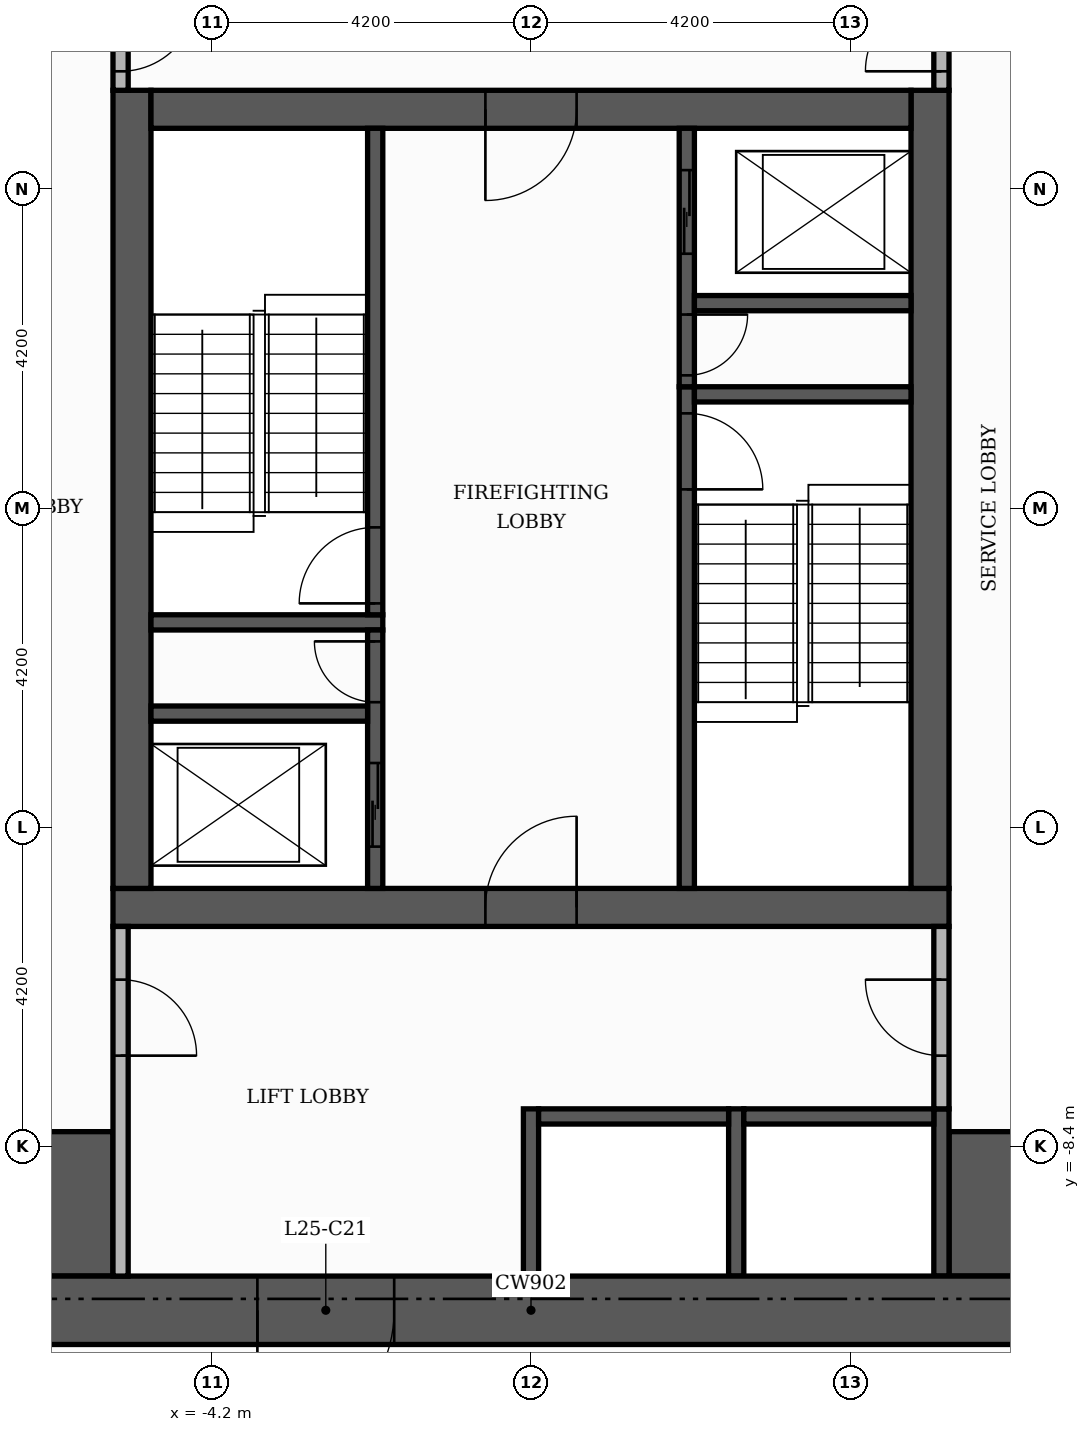
"""IFC4 building model, lengths in metres.
Left out: names, types, materials, properties, quantities, classifications, styles, units other than length and angle.
Written with IfcOpenShell. Run it as: python <this file> out.ifc"""

import sys

from ifc_helpers import new_model, si_unit, direction, frame, frame_2d, origin, place, context, subcontext, project, spatial, rectangle, extrude, element, fill, save


model = new_model("IFC4")
c1 = context("Model", 3, precision=1e-05, world=origin(), true_north=direction((0.0, 1.0)))
c2 = subcontext(c1, "Body", "Model", "MODEL_VIEW")
j1 = project(units=[si_unit("LENGTHUNIT", "METRE"), si_unit("PLANEANGLEUNIT", "RADIAN")], contexts=[c1])
p1 = place(None, origin())
s1 = spatial("IfcSite", under=j1, at=p1, CompositionType="ELEMENT")
p2 = place(p1, origin())
s2 = spatial("IfcBuilding", under=s1, at=p2, CompositionType="ELEMENT")
p3 = place(p2, frame((0.0, 0.0, 106.5)))
s3 = spatial("IfcBuildingStorey", under=s2, at=p3, CompositionType="ELEMENT", Elevation=106.5)
p4 = place(p3, frame((-5.5, -5.25, 0.0), z_axis=(0.0, 0.0, 1.0), x_axis=(1.0, 0.0, 0.0)))
e1 = element("IfcWall", 1, at=p4, inside=s3, PredefinedType="SHEAR", context=c2, shape_type="SweptSolid", body=[
    extrude(rectangle(XDim=11.0, YDim=0.5, at=frame_2d((5.5, 0.0))), origin(), (0.0, 0.0, 1.0), 3.48),
])
p5 = place(p4, frame((4.9, 0.0, 0.0)))
e2 = element("IfcOpeningElement", 2, at=p5, cuts=e1, PredefinedType="OPENING", context=c2, shape_type="SweptSolid", body=[
    extrude(rectangle(XDim=1.2, YDim=2.1, at=frame_2d((0.6, 1.05))), frame((0.0, 0.26, 0.0), z_axis=(0.0, -1.0, 0.0), x_axis=(1.0, 0.0, 0.0)), (0.0, 0.0, 1.0), 0.52),
])
for number, where, z_axis, x_axis in (
    (3, (-5.25, -5.0, 0.0), (0.0, 0.0, 1.0), (0.0, 1.0, 0.0)),
    (4, (5.25, -5.0, 0.0), (0.0, 0.0, 1.0), (0.0, 1.0, 0.0)),
):
    element("IfcWall", number, at=place(p3, frame(where, z_axis=z_axis, x_axis=x_axis)), inside=s3, PredefinedType="SHEAR", context=c2, shape_type="SweptSolid", body=[
        extrude(rectangle(XDim=10.5, YDim=0.5, at=frame_2d((5.25, 0.0))), origin(), (0.0, 0.0, 1.0), 3.48),
    ])
p6 = place(p3, frame((-5.0, 5.25, 0.0), z_axis=(0.0, 0.0, 1.0), x_axis=(1.0, 0.0, 0.0)))
e5 = element("IfcWall", 5, at=p6, inside=s3, PredefinedType="SHEAR", context=c2, shape_type="SweptSolid", body=[
    extrude(rectangle(XDim=10.0, YDim=0.5, at=frame_2d((5.0, 0.0))), origin(), (0.0, 0.0, 1.0), 3.48),
])
p7 = place(p6, frame((4.4, 0.0, 0.0)))
e6 = element("IfcOpeningElement", 6, at=p7, cuts=e5, PredefinedType="OPENING", context=c2, shape_type="SweptSolid", body=[
    extrude(rectangle(XDim=1.2, YDim=2.1, at=frame_2d((0.6, 1.05))), frame((0.0, 0.26, 0.0), z_axis=(0.0, -1.0, 0.0), x_axis=(1.0, 0.0, 0.0)), (0.0, 0.0, 1.0), 0.52),
])
for number, where, z_axis, x_axis in (
    (7, (-10.1, -9.15, 0.0), (0.0, 0.0, 1.0), (1.0, 0.0, 0.0)),
    (8, (5.5, -9.15, 0.0), (0.0, 0.0, 1.0), (1.0, 0.0, 0.0)),
):
    element("IfcWall", number, at=place(p3, frame(where, z_axis=z_axis, x_axis=x_axis)), inside=s3, PredefinedType="SHEAR", context=c2, shape_type="SweptSolid", body=[
        extrude(rectangle(XDim=4.6, YDim=1.9, at=frame_2d((2.3, 0.0))), origin(), (0.0, 0.0, 1.0), 3.48),
    ])
p8 = place(p3, frame((2.05, -5.0, 0.0), z_axis=(0.0, 0.0, 1.0), x_axis=(0.0, 1.0, 0.0)))
e9 = element("IfcWall", 9, at=p8, inside=s3, PredefinedType="SHEAR", context=c2, shape_type="SweptSolid", body=[
    extrude(rectangle(XDim=6.6, YDim=0.2, at=frame_2d((3.3, 0.0))), origin(), (0.0, 0.0, 1.0), 3.48),
])
p9 = place(p8, frame((5.25, 0.0, 0.0)))
e10 = element("IfcOpeningElement", 10, at=p9, cuts=e9, PredefinedType="OPENING", context=c2, shape_type="SweptSolid", body=[
    extrude(rectangle(XDim=1.0, YDim=2.1, at=frame_2d((0.5, 1.05))), frame((0.0, 0.11, 0.0), z_axis=(0.0, -1.0, 0.0), x_axis=(1.0, 0.0, 0.0)), (0.0, 0.0, 1.0), 0.22),
])
p10 = place(p3, frame((-5.0, -1.5, 0.0), z_axis=(0.0, 0.0, 1.0), x_axis=(1.0, 0.0, 0.0)))
e11 = element("IfcWall", 11, at=p10, inside=s3, PredefinedType="SHEAR", context=c2, shape_type="SweptSolid", body=[
    extrude(rectangle(XDim=3.05, YDim=0.2, at=frame_2d((1.525, 0.0))), origin(), (0.0, 0.0, 1.0), 3.48),
])
p11 = place(p3, frame((-2.05, -1.4, 0.0), z_axis=(0.0, 0.0, 1.0), x_axis=(0.0, 1.0, 0.0)))
e12 = element("IfcWall", 12, at=p11, inside=s3, PredefinedType="SHEAR", context=c2, shape_type="SweptSolid", body=[
    extrude(rectangle(XDim=6.4, YDim=0.2, at=frame_2d((3.2, 0.0))), origin(), (0.0, 0.0, 1.0), 3.48),
])
p12 = place(p11, frame((0.15, 0.0, 0.0)))
e13 = element("IfcOpeningElement", 13, at=p12, cuts=e12, PredefinedType="OPENING", context=c2, shape_type="SweptSolid", body=[
    extrude(rectangle(XDim=1.0, YDim=2.1, at=frame_2d((0.5, 1.05))), frame((0.0, 0.11, 0.0), z_axis=(0.0, -1.0, 0.0), x_axis=(1.0, 0.0, 0.0)), (0.0, 0.0, 1.0), 0.22),
])
p13 = place(p3, frame((2.15, 1.5, 0.0), z_axis=(0.0, 0.0, 1.0), x_axis=(1.0, 0.0, 0.0)))
e14 = element("IfcWall", 14, at=p13, inside=s3, PredefinedType="SHEAR", context=c2, shape_type="SweptSolid", body=[
    extrude(rectangle(XDim=2.85, YDim=0.2, at=frame_2d((1.425, 0.0))), origin(), (0.0, 0.0, 1.0), 3.48),
])
for number, where, z_axis, x_axis in (
    (15, (0.0, -10.1, 0.0), (0.0, 0.0, 1.0), (0.0, 1.0, 0.0)),
    (16, (2.7, -10.1, 0.0), (0.0, 0.0, 1.0), (0.0, 1.0, 0.0)),
    (17, (5.4, -10.1, 0.0), (0.0, 0.0, 1.0), (0.0, 1.0, 0.0)),
):
    element("IfcWall", number, at=place(p3, frame(where, z_axis=z_axis, x_axis=x_axis)), inside=s3, PredefinedType="SHEAR", context=c2, shape_type="SweptSolid", body=[
        extrude(rectangle(XDim=2.2, YDim=0.2, at=frame_2d((1.1, 0.0))), origin(), (0.0, 0.0, 1.0), 3.48),
    ])
for number, where, z_axis, x_axis in (
    (18, (0.1, -8.0, 0.0), (0.0, 0.0, 1.0), (1.0, 0.0, 0.0)),
    (19, (2.8, -8.0, 0.0), (0.0, 0.0, 1.0), (1.0, 0.0, 0.0)),
):
    element("IfcWall", number, at=place(p3, frame(where, z_axis=z_axis, x_axis=x_axis)), inside=s3, PredefinedType="SHEAR", context=c2, shape_type="SweptSolid", body=[
        extrude(rectangle(XDim=2.5, YDim=0.2, at=frame_2d((1.25, 0.0))), origin(), (0.0, 0.0, 1.0), 3.48),
    ])
p14 = place(p3, frame((-2.05, -5.0, 0.0), z_axis=(0.0, 0.0, 1.0), x_axis=(0.0, 1.0, 0.0)))
e20 = element("IfcWall", 20, at=p14, inside=s3, PredefinedType="SHEAR", context=c2, shape_type="SweptSolid", body=[
    extrude(rectangle(XDim=3.4, YDim=0.2, at=frame_2d((1.7, 0.0))), origin(), (0.0, 0.0, 1.0), 3.48),
])
p15 = place(p14, frame((0.55, 0.0, 0.0)))
e21 = element("IfcOpeningElement", 21, at=p15, cuts=e20, PredefinedType="OPENING", context=c2, shape_type="SweptSolid", body=[
    extrude(rectangle(XDim=1.1, YDim=2.1, at=frame_2d((0.55, 1.05))), frame((0.0, 0.11, 0.0), z_axis=(0.0, -1.0, 0.0), x_axis=(1.0, 0.0, 0.0)), (0.0, 0.0, 1.0), 0.22),
])
p16 = place(p14, frame((2.45, 0.0, 0.0)))
e22 = element("IfcOpeningElement", 22, at=p16, cuts=e20, PredefinedType="OPENING", context=c2, shape_type="SweptSolid", body=[
    extrude(rectangle(XDim=0.8, YDim=2.1, at=frame_2d((0.4, 1.05))), frame((0.0, 0.11, 0.0), z_axis=(0.0, -1.0, 0.0), x_axis=(1.0, 0.0, 0.0)), (0.0, 0.0, 1.0), 0.22),
])
p17 = place(p3, frame((-5.0, -2.7, 0.0), z_axis=(0.0, 0.0, 1.0), x_axis=(1.0, 0.0, 0.0)))
e23 = element("IfcWall", 23, at=p17, inside=s3, PredefinedType="SHEAR", context=c2, shape_type="SweptSolid", body=[
    extrude(rectangle(XDim=2.85, YDim=0.2, at=frame_2d((1.425, 0.0))), origin(), (0.0, 0.0, 1.0), 3.48),
])
p18 = place(p3, frame((2.05, 1.6, 0.0), z_axis=(0.0, 0.0, 1.0), x_axis=(0.0, 1.0, 0.0)))
e24 = element("IfcWall", 24, at=p18, inside=s3, PredefinedType="SHEAR", context=c2, shape_type="SweptSolid", body=[
    extrude(rectangle(XDim=3.4, YDim=0.2, at=frame_2d((1.7, 0.0))), origin(), (0.0, 0.0, 1.0), 3.48),
])
p19 = place(p18, frame((1.75, 0.0, 0.0)))
e25 = element("IfcOpeningElement", 25, at=p19, cuts=e24, PredefinedType="OPENING", context=c2, shape_type="SweptSolid", body=[
    extrude(rectangle(XDim=1.1, YDim=2.1, at=frame_2d((0.55, 1.05))), frame((0.0, 0.11, 0.0), z_axis=(0.0, -1.0, 0.0), x_axis=(1.0, 0.0, 0.0)), (0.0, 0.0, 1.0), 0.22),
])
p20 = place(p18, frame((0.15, 0.0, 0.0)))
e26 = element("IfcOpeningElement", 26, at=p20, cuts=e24, PredefinedType="OPENING", context=c2, shape_type="SweptSolid", body=[
    extrude(rectangle(XDim=0.8, YDim=2.1, at=frame_2d((0.4, 1.05))), frame((0.0, 0.11, 0.0), z_axis=(0.0, -1.0, 0.0), x_axis=(1.0, 0.0, 0.0)), (0.0, 0.0, 1.0), 0.22),
])
p21 = place(p3, frame((2.15, 2.7, 0.0), z_axis=(0.0, 0.0, 1.0), x_axis=(1.0, 0.0, 0.0)))
e27 = element("IfcWall", 27, at=p21, inside=s3, PredefinedType="SHEAR", context=c2, shape_type="SweptSolid", body=[
    extrude(rectangle(XDim=2.85, YDim=0.2, at=frame_2d((1.425, 0.0))), origin(), (0.0, 0.0, 1.0), 3.48),
])
p22 = place(p3, frame((-11.0, -10.55, 0.0), z_axis=(0.0, 0.0, 1.0), x_axis=(1.0, 0.0, 0.0)))
e28 = element("IfcWall", 28, at=p22, inside=s3, PredefinedType="SHEAR", context=c2, shape_type="SweptSolid", body=[
    extrude(rectangle(XDim=22.0, YDim=0.9, at=frame_2d((11.0, 0.0))), origin(), (0.0, 0.0, 1.0), 3.48),
])
p23 = place(p22, frame((7.4, 0.0, 0.0)))
e29 = element("IfcOpeningElement", 29, at=p23, cuts=e28, PredefinedType="OPENING", context=c2, shape_type="SweptSolid", body=[
    extrude(rectangle(XDim=1.8, YDim=2.2, at=frame_2d((0.9, 1.1))), frame((0.0, 0.46, 0.0), z_axis=(0.0, -1.0, 0.0), x_axis=(1.0, 0.0, 0.0)), (0.0, 0.0, 1.0), 0.92),
])
p24 = place(p3, frame((-5.4, -10.1, 0.0), z_axis=(0.0, 0.0, 1.0), x_axis=(0.0, 1.0, 0.0)))
e30 = element("IfcWall", 30, at=p24, inside=s3, PredefinedType="PARTITIONING", context=c2, shape_type="SweptSolid", body=[
    extrude(rectangle(XDim=4.6, YDim=0.2, at=frame_2d((2.3, 0.0))), origin(), (0.0, 0.0, 1.0), 3.48),
])
p25 = place(p24, frame((2.9, 0.0, 0.0)))
e31 = element("IfcOpeningElement", 31, at=p25, cuts=e30, PredefinedType="OPENING", context=c2, shape_type="SweptSolid", body=[
    extrude(rectangle(XDim=1.0, YDim=2.1, at=frame_2d((0.5, 1.05))), frame((0.0, 0.11, 0.0), z_axis=(0.0, -1.0, 0.0), x_axis=(1.0, 0.0, 0.0)), (0.0, 0.0, 1.0), 0.22),
])
p26 = place(p3, frame((5.4, -7.9, 0.0), z_axis=(0.0, 0.0, 1.0), x_axis=(0.0, 1.0, 0.0)))
e32 = element("IfcWall", 32, at=p26, inside=s3, PredefinedType="PARTITIONING", context=c2, shape_type="SweptSolid", body=[
    extrude(rectangle(XDim=2.4, YDim=0.2, at=frame_2d((1.2, 0.0))), origin(), (0.0, 0.0, 1.0), 3.48),
])
p27 = place(p26, frame((0.7, 0.0, 0.0)))
e33 = element("IfcOpeningElement", 33, at=p27, cuts=e32, PredefinedType="OPENING", context=c2, shape_type="SweptSolid", body=[
    extrude(rectangle(XDim=1.0, YDim=2.1, at=frame_2d((0.5, 1.05))), frame((0.0, 0.11, 0.0), z_axis=(0.0, -1.0, 0.0), x_axis=(1.0, 0.0, 0.0)), (0.0, 0.0, 1.0), 0.22),
])
p28 = place(p3, frame((-5.4, 5.5, 0.0), z_axis=(0.0, 0.0, 1.0), x_axis=(0.0, 1.0, 0.0)))
e34 = element("IfcWall", 34, at=p28, inside=s3, PredefinedType="PARTITIONING", context=c2, shape_type="SweptSolid", body=[
    extrude(rectangle(XDim=1.55, YDim=0.2, at=frame_2d((0.775, 0.0))), origin(), (0.0, 0.0, 1.0), 3.48),
])
p29 = place(p28, frame((0.25, 0.0, 0.0)))
e35 = element("IfcOpeningElement", 35, at=p29, cuts=e34, PredefinedType="OPENING", context=c2, shape_type="SweptSolid", body=[
    extrude(rectangle(XDim=1.0, YDim=2.1, at=frame_2d((0.5, 1.05))), frame((0.0, 0.11, 0.0), z_axis=(0.0, -1.0, 0.0), x_axis=(1.0, 0.0, 0.0)), (0.0, 0.0, 1.0), 0.22),
])
p30 = place(p3, frame((5.4, 5.5, 0.0), z_axis=(0.0, 0.0, 1.0), x_axis=(0.0, 1.0, 0.0)))
e36 = element("IfcWall", 36, at=p30, inside=s3, PredefinedType="PARTITIONING", context=c2, shape_type="SweptSolid", body=[
    extrude(rectangle(XDim=4.6, YDim=0.2, at=frame_2d((2.3, 0.0))), origin(), (0.0, 0.0, 1.0), 3.48),
])
p31 = place(p30, frame((0.25, 0.0, 0.0)))
e37 = element("IfcOpeningElement", 37, at=p31, cuts=e36, PredefinedType="OPENING", context=c2, shape_type="SweptSolid", body=[
    extrude(rectangle(XDim=1.0, YDim=2.1, at=frame_2d((0.5, 1.05))), frame((0.0, 0.11, 0.0), z_axis=(0.0, -1.0, 0.0), x_axis=(1.0, 0.0, 0.0)), (0.0, 0.0, 1.0), 0.22),
])
p32 = place(p19, origin())
e38 = element("IfcDoor", 38, at=p32, inside=s3, OperationType="SLIDING_TO_LEFT", PredefinedType="DOOR", context=c2, shape_type="SweptSolid", body=[
    extrude(rectangle(XDim=1.1, YDim=2.1, at=frame_2d((0.55, 1.05))), frame((0.0, 0.025, 0.0), z_axis=(0.0, -1.0, 0.0), x_axis=(1.0, 0.0, 0.0)), (0.0, 0.0, 1.0), 0.05),
])
fill(e25, e38)
p33 = place(p15, origin())
e39 = element("IfcDoor", 39, at=p33, inside=s3, OperationType="SLIDING_TO_LEFT", PredefinedType="DOOR", context=c2, shape_type="SweptSolid", body=[
    extrude(rectangle(XDim=1.1, YDim=2.1, at=frame_2d((0.55, 1.05))), frame((0.0, 0.025, 0.0), z_axis=(0.0, -1.0, 0.0), x_axis=(1.0, 0.0, 0.0)), (0.0, 0.0, 1.0), 0.05),
])
fill(e21, e39)
p34 = place(p12, origin())
e40 = element("IfcDoor", 40, at=p34, inside=s3, OperationType="SINGLE_SWING_LEFT", PredefinedType="DOOR", context=c2, shape_type="SweptSolid", body=[
    extrude(rectangle(XDim=1.0, YDim=2.1, at=frame_2d((0.5, 1.05))), frame((0.0, 0.025, 0.0), z_axis=(0.0, -1.0, 0.0), x_axis=(1.0, 0.0, 0.0)), (0.0, 0.0, 1.0), 0.05),
])
fill(e13, e40)
p35 = place(p9, frame((1.0, 0.0, 0.0), z_axis=(0.0, 0.0, 1.0), x_axis=(-1.0, 0.0, 0.0)))
e41 = element("IfcDoor", 41, at=p35, inside=s3, OperationType="SINGLE_SWING_LEFT", PredefinedType="DOOR", context=c2, shape_type="SweptSolid", body=[
    extrude(rectangle(XDim=1.0, YDim=2.1, at=frame_2d((0.5, 1.05))), frame((0.0, 0.025, 0.0), z_axis=(0.0, -1.0, 0.0), x_axis=(1.0, 0.0, 0.0)), (0.0, 0.0, 1.0), 0.05),
])
fill(e10, e41)
p36 = place(p20, frame((0.8, 0.0, 0.0), z_axis=(0.0, 0.0, 1.0), x_axis=(-1.0, 0.0, 0.0)))
e42 = element("IfcDoor", 42, at=p36, inside=s3, OperationType="SINGLE_SWING_RIGHT", PredefinedType="DOOR", context=c2, shape_type="SweptSolid", body=[
    extrude(rectangle(XDim=0.8, YDim=2.1, at=frame_2d((0.4, 1.05))), frame((0.0, 0.025, 0.0), z_axis=(0.0, -1.0, 0.0), x_axis=(1.0, 0.0, 0.0)), (0.0, 0.0, 1.0), 0.05),
])
fill(e26, e42)
p37 = place(p16, origin())
e43 = element("IfcDoor", 43, at=p37, inside=s3, OperationType="SINGLE_SWING_RIGHT", PredefinedType="DOOR", context=c2, shape_type="SweptSolid", body=[
    extrude(rectangle(XDim=0.8, YDim=2.1, at=frame_2d((0.4, 1.05))), frame((0.0, 0.025, 0.0), z_axis=(0.0, -1.0, 0.0), x_axis=(1.0, 0.0, 0.0)), (0.0, 0.0, 1.0), 0.05),
])
fill(e22, e43)
p38 = place(p7, frame((1.2, 0.0, 0.0), z_axis=(0.0, 0.0, 1.0), x_axis=(-1.0, 0.0, 0.0)))
e44 = element("IfcDoor", 44, at=p38, inside=s3, OperationType="SINGLE_SWING_LEFT", PredefinedType="DOOR", context=c2, shape_type="SweptSolid", body=[
    extrude(rectangle(XDim=1.2, YDim=2.1, at=frame_2d((0.6, 1.05))), frame((0.0, 0.025, 0.0), z_axis=(0.0, -1.0, 0.0), x_axis=(1.0, 0.0, 0.0)), (0.0, 0.0, 1.0), 0.05),
])
fill(e6, e44)
p39 = place(p5, origin())
e45 = element("IfcDoor", 45, at=p39, inside=s3, OperationType="SINGLE_SWING_RIGHT", PredefinedType="DOOR", context=c2, shape_type="SweptSolid", body=[
    extrude(rectangle(XDim=1.2, YDim=2.1, at=frame_2d((0.6, 1.05))), frame((0.0, 0.025, 0.0), z_axis=(0.0, -1.0, 0.0), x_axis=(1.0, 0.0, 0.0)), (0.0, 0.0, 1.0), 0.05),
])
fill(e2, e45)
p40 = place(p29, frame((1.0, 0.0, 0.0), z_axis=(0.0, 0.0, 1.0), x_axis=(-1.0, 0.0, 0.0)))
e46 = element("IfcDoor", 46, at=p40, inside=s3, OperationType="SINGLE_SWING_RIGHT", PredefinedType="DOOR", context=c2, shape_type="SweptSolid", body=[
    extrude(rectangle(XDim=1.0, YDim=2.1, at=frame_2d((0.5, 1.05))), frame((0.0, 0.025, 0.0), z_axis=(0.0, -1.0, 0.0), x_axis=(1.0, 0.0, 0.0)), (0.0, 0.0, 1.0), 0.05),
])
fill(e35, e46)
p41 = place(p31, origin())
e47 = element("IfcDoor", 47, at=p41, inside=s3, OperationType="SINGLE_SWING_LEFT", PredefinedType="DOOR", context=c2, shape_type="SweptSolid", body=[
    extrude(rectangle(XDim=1.0, YDim=2.1, at=frame_2d((0.5, 1.05))), frame((0.0, 0.025, 0.0), z_axis=(0.0, -1.0, 0.0), x_axis=(1.0, 0.0, 0.0)), (0.0, 0.0, 1.0), 0.05),
])
fill(e37, e47)
p42 = place(p25, frame((1.0, 0.0, 0.0), z_axis=(0.0, 0.0, 1.0), x_axis=(-1.0, 0.0, 0.0)))
e48 = element("IfcDoor", 48, at=p42, inside=s3, OperationType="SINGLE_SWING_LEFT", PredefinedType="DOOR", context=c2, shape_type="SweptSolid", body=[
    extrude(rectangle(XDim=1.0, YDim=2.1, at=frame_2d((0.5, 1.05))), frame((0.0, 0.025, 0.0), z_axis=(0.0, -1.0, 0.0), x_axis=(1.0, 0.0, 0.0)), (0.0, 0.0, 1.0), 0.05),
])
fill(e31, e48)
p43 = place(p27, origin())
e49 = element("IfcDoor", 49, at=p43, inside=s3, OperationType="SINGLE_SWING_RIGHT", PredefinedType="DOOR", context=c2, shape_type="SweptSolid", body=[
    extrude(rectangle(XDim=1.0, YDim=2.1, at=frame_2d((0.5, 1.05))), frame((0.0, 0.025, 0.0), z_axis=(0.0, -1.0, 0.0), x_axis=(1.0, 0.0, 0.0)), (0.0, 0.0, 1.0), 0.05),
])
fill(e33, e49)
p44 = place(p23, frame((1.8, 0.0, 0.0), z_axis=(0.0, 0.0, 1.0), x_axis=(-1.0, 0.0, 0.0)))
e50 = element("IfcDoor", 50, at=p44, inside=s3, OperationType="DOUBLE_DOOR_SINGLE_SWING", PredefinedType="DOOR", context=c2, shape_type="SweptSolid", body=[
    extrude(rectangle(XDim=1.8, YDim=2.2, at=frame_2d((0.9, 1.1))), frame((0.0, 0.025, 0.0), z_axis=(0.0, -1.0, 0.0), x_axis=(1.0, 0.0, 0.0)), (0.0, 0.0, 1.0), 0.05),
])
fill(e29, e50)
save(model, sys.argv[1])
